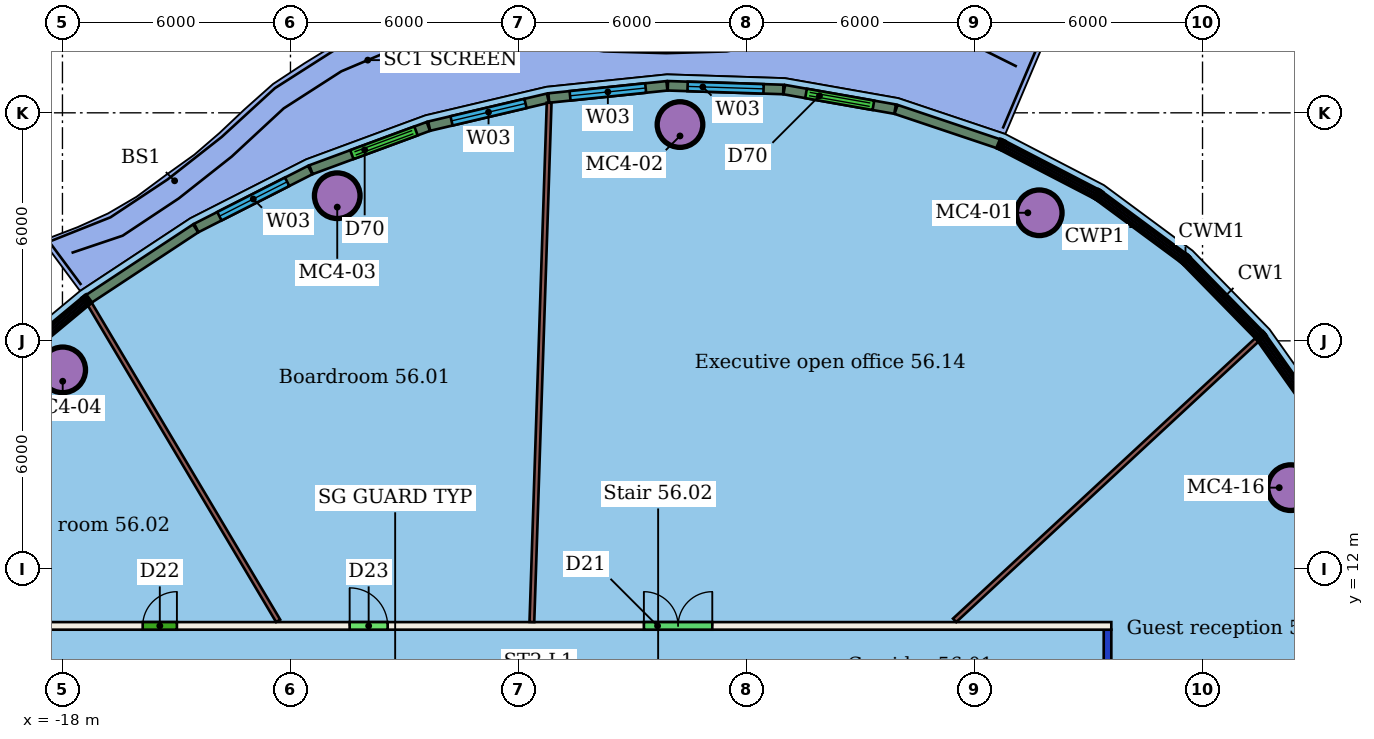
"""IFC4 building model, lengths in metres.
Left out: names, types, materials, properties, quantities, classifications, styles, units other than length and angle.
Written with IfcOpenShell. Run it as: python <this file> out.ifc"""

import sys

from ifc_helpers import new_model, si_unit, direction, frame, frame_2d, origin, origin_2d, place, context, subcontext, project, spatial, rectangle, hollow_circle, extrude, element, fill, save


model = new_model("IFC4")
c1 = context("Model", 3, precision=1e-05, world=origin(), true_north=direction((0.0, 1.0)))
c2 = subcontext(c1, "Body", "Model", "MODEL_VIEW")
j1 = project(units=[si_unit("LENGTHUNIT", "METRE"), si_unit("PLANEANGLEUNIT", "RADIAN")], contexts=[c1])
p1 = place(None, origin())
s1 = spatial("IfcSite", under=j1, at=p1, CompositionType="ELEMENT")
p2 = place(p1, origin())
s2 = spatial("IfcBuilding", under=s1, at=p2, CompositionType="ELEMENT")
p3 = place(p2, frame((0.0, 0.0, 228.1)))
s3 = spatial("IfcBuildingStorey", under=s2, at=p3, CompositionType="ELEMENT", Elevation=228.1)
for number, where, z_axis, x_axis in (
    (1, (7.704, 21.37, 0.0), (0.0, 0.0, 1.0), (1.0, 0.0, 0.0)),
    (2, (-1.75, 23.691, 0.0), (0.0, 0.0, 1.0), (1.0, 0.0, 0.0)),
    (3, (-10.769, 21.819, 0.0), (0.0, 0.0, 1.0), (1.0, 0.0, 0.0)),
    (4, (-17.993, 17.237, 0.0), (0.0, 0.0, 1.0), (1.0, 0.0, 0.0)),
    (5, (14.318, 14.137, 0.0), (0.0, 0.0, 1.0), (1.0, 0.0, 0.0)),
):
    element("IfcColumn", number, at=place(p3, frame(where, z_axis=z_axis, x_axis=x_axis)), inside=s3, PredefinedType="COLUMN", context=c2, shape_type="SweptSolid", body=[
        extrude(hollow_circle(Radius=0.6, WallThickness=0.045, at=origin_2d()), origin(), (0.0, 0.0, 1.0), 3.45),
    ])
p4 = place(p3, frame((-21.6, 10.5, 0.0), z_axis=(0.0, 0.0, 1.0), x_axis=(1.0, 0.0, 0.0)))
e6 = element("IfcWall", 6, at=p4, inside=s3, PredefinedType="PARTITIONING", context=c2, shape_type="SweptSolid", body=[
    extrude(rectangle(XDim=31.2, YDim=0.2, at=frame_2d((15.6, 0.0))), origin(), (0.0, 0.0, 1.0), 3.45),
])
p5 = place(p4, frame((11.157, 0.0, 0.0)))
e7 = element("IfcOpeningElement", 7, at=p5, cuts=e6, PredefinedType="OPENING", context=c2, shape_type="SweptSolid", body=[
    extrude(rectangle(XDim=1.0, YDim=2.4, at=frame_2d((0.5, 1.2))), frame((0.0, 0.11, 0.0), z_axis=(0.0, -1.0, 0.0), x_axis=(1.0, 0.0, 0.0)), (0.0, 0.0, 1.0), 0.22),
])
p6 = place(p4, frame((5.712, 0.0, 0.0)))
e8 = element("IfcOpeningElement", 8, at=p6, cuts=e6, PredefinedType="OPENING", context=c2, shape_type="SweptSolid", body=[
    extrude(rectangle(XDim=0.9, YDim=2.1, at=frame_2d((0.45, 1.05))), frame((0.0, 0.11, 0.0), z_axis=(0.0, -1.0, 0.0), x_axis=(1.0, 0.0, 0.0)), (0.0, 0.0, 1.0), 0.22),
])
p7 = place(p4, frame((18.9, 0.0, 0.0)))
e9 = element("IfcOpeningElement", 9, at=p7, cuts=e6, PredefinedType="OPENING", context=c2, shape_type="SweptSolid", body=[
    extrude(rectangle(XDim=1.8, YDim=2.1, at=frame_2d((0.9, 1.05))), frame((0.0, 0.11, 0.0), z_axis=(0.0, -1.0, 0.0), x_axis=(1.0, 0.0, 0.0)), (0.0, 0.0, 1.0), 0.22),
])
p8 = place(p3, frame((9.5, 10.4, 0.0), z_axis=(0.0, 0.0, 1.0), x_axis=(0.0, -1.0, 0.0)))
e10 = element("IfcWall", 10, at=p8, inside=s3, PredefinedType="PARTITIONING", context=c2, shape_type="SweptSolid", body=[
    extrude(rectangle(XDim=20.8, YDim=0.2, at=frame_2d((10.4, 0.0))), origin(), (0.0, 0.0, 1.0), 3.05),
])
p9 = place(p8, frame((16.182, 0.0, 0.0)))
e11 = element("IfcOpeningElement", 11, at=p9, cuts=e10, PredefinedType="OPENING", context=c2, shape_type="SweptSolid", body=[
    extrude(rectangle(XDim=1.0, YDim=2.4, at=frame_2d((0.5, 1.2))), frame((0.0, 0.11, 0.0), z_axis=(0.0, -1.0, 0.0), x_axis=(1.0, 0.0, 0.0)), (0.0, 0.0, 1.0), 0.22),
])
p10 = place(p8, frame((12.086, 0.0, 0.0)))
e12 = element("IfcOpeningElement", 12, at=p10, cuts=e10, PredefinedType="OPENING", context=c2, shape_type="SweptSolid", body=[
    extrude(rectangle(XDim=1.0, YDim=2.4, at=frame_2d((0.5, 1.2))), frame((0.0, 0.11, 0.0), z_axis=(0.0, -1.0, 0.0), x_axis=(1.0, 0.0, 0.0)), (0.0, 0.0, 1.0), 0.22),
])
p11 = place(p8, frame((6.779, 0.0, 0.0)))
e13 = element("IfcOpeningElement", 13, at=p11, cuts=e10, PredefinedType="OPENING", context=c2, shape_type="SweptSolid", body=[
    extrude(rectangle(XDim=0.9, YDim=2.1, at=frame_2d((0.45, 1.05))), frame((0.0, 0.11, 0.0), z_axis=(0.0, -1.0, 0.0), x_axis=(1.0, 0.0, 0.0)), (0.0, 0.0, 1.0), 0.22),
])
p12 = place(p8, frame((2.875, 0.0, 0.0)))
e14 = element("IfcOpeningElement", 14, at=p12, cuts=e10, PredefinedType="OPENING", context=c2, shape_type="SweptSolid", body=[
    extrude(rectangle(XDim=1.2, YDim=2.4, at=frame_2d((0.6, 1.2))), frame((0.0, 0.11, 0.0), z_axis=(0.0, -1.0, 0.0), x_axis=(1.0, 0.0, 0.0)), (0.0, 0.0, 1.0), 0.22),
])
p13 = place(p3, frame((-5.193, 24.265, 0.0), z_axis=(0.0, 0.0, 1.0), x_axis=(-0.033235742761, -0.999447540096, 0.0)))
e15 = element("IfcWall", 15, at=p13, inside=s3, PredefinedType="PARTITIONING", context=c2, shape_type="SweptSolid", body=[
    extrude(rectangle(XDim=13.67, YDim=0.125, at=frame_2d((6.835, 0.0))), origin(), (0.0, 0.0, 1.0), 3.45),
])
p14 = place(p3, frame((-17.283, 18.97, 0.0), z_axis=(0.0, 0.0, 1.0), x_axis=(0.51119848964, -0.859462683419, 0.0)))
e16 = element("IfcWall", 16, at=p14, inside=s3, PredefinedType="PARTITIONING", context=c2, shape_type="SweptSolid", body=[
    extrude(rectangle(XDim=9.702, YDim=0.125, at=frame_2d((4.851, 0.0))), origin(), (0.0, 0.0, 1.0), 3.45),
])
p15 = place(p3, frame((13.437, 18.031, 0.0), z_axis=(0.0, 0.0, 1.0), x_axis=(-0.733128123603, -0.680090548665, 0.0)))
e17 = element("IfcWall", 17, at=p15, inside=s3, PredefinedType="PARTITIONING", context=c2, shape_type="SweptSolid", body=[
    extrude(rectangle(XDim=10.859, YDim=0.125, at=frame_2d((5.429, 0.0))), origin(), (0.0, 0.0, 1.0), 3.45),
])
p16 = place(p3, frame((6.642, 23.183, 0.0), z_axis=(0.0, 0.0, 1.0), x_axis=(-0.948125770961, 0.31789545835, 0.0)))
e18 = element("IfcWall", 18, at=p16, inside=s3, PredefinedType="SOLIDWALL", context=c2, shape_type="SweptSolid", body=[
    extrude(rectangle(XDim=2.854, YDim=0.25, at=frame_2d((1.427, 0.0))), origin(), (0.0, 0.0, 1.0), 3.1),
])
p17 = place(p3, frame((3.91, 24.097, 0.0), z_axis=(0.0, 0.0, 1.0), x_axis=(-0.984808450363, 0.173644222745, 0.0)))
e19 = element("IfcWall", 19, at=p17, inside=s3, PredefinedType="SOLIDWALL", context=c2, shape_type="SweptSolid", body=[
    extrude(rectangle(XDim=2.961, YDim=0.25, at=frame_2d((1.48, 0.0))), origin(), (0.0, 0.0, 1.0), 3.1),
])
p18 = place(p17, frame((0.58, 0.0, 0.0)))
e20 = element("IfcOpeningElement", 20, at=p18, cuts=e19, PredefinedType="OPENING", context=c2, shape_type="SweptSolid", body=[
    extrude(rectangle(XDim=1.8, YDim=2.4, at=frame_2d((0.9, 1.2))), frame((0.0, 0.135, 0.0), z_axis=(0.0, -1.0, 0.0), x_axis=(1.0, 0.0, 0.0)), (0.0, 0.0, 1.0), 0.27),
])
p19 = place(p3, frame((0.969, 24.614, 0.0), z_axis=(0.0, 0.0, 1.0), x_axis=(-0.999483698552, 0.032129991113, 0.0)))
e21 = element("IfcWall", 21, at=p19, inside=s3, PredefinedType="SOLIDWALL", context=c2, shape_type="SweptSolid", body=[
    extrude(rectangle(XDim=3.039, YDim=0.25, at=frame_2d((1.52, 0.0))), origin(), (0.0, 0.0, 1.0), 3.1),
])
p20 = place(p19, frame((0.52, 0.0, 0.9)))
e22 = element("IfcOpeningElement", 22, at=p20, cuts=e21, PredefinedType="OPENING", context=c2, shape_type="SweptSolid", body=[
    extrude(rectangle(XDim=2.0, YDim=2.1, at=frame_2d((1.0, 1.05))), frame((0.0, 0.135, 0.0), z_axis=(0.0, -1.0, 0.0), x_axis=(1.0, 0.0, 0.0)), (0.0, 0.0, 1.0), 0.27),
])
p21 = place(p3, frame((-2.094, 24.711, 0.0), z_axis=(0.0, 0.0, 1.0), x_axis=(-0.994698961738, -0.102829837679, 0.0)))
e23 = element("IfcWall", 23, at=p21, inside=s3, PredefinedType="SOLIDWALL", context=c2, shape_type="SweptSolid", body=[
    extrude(rectangle(XDim=3.125, YDim=0.25, at=frame_2d((1.562, 0.0))), origin(), (0.0, 0.0, 1.0), 3.1),
])
p22 = place(p21, frame((0.562, 0.0, 0.9)))
e24 = element("IfcOpeningElement", 24, at=p22, cuts=e23, PredefinedType="OPENING", context=c2, shape_type="SweptSolid", body=[
    extrude(rectangle(XDim=2.0, YDim=2.1, at=frame_2d((1.0, 1.05))), frame((0.0, 0.135, 0.0), z_axis=(0.0, -1.0, 0.0), x_axis=(1.0, 0.0, 0.0)), (0.0, 0.0, 1.0), 0.27),
])
p23 = place(p3, frame((-5.226, 24.385, 0.0), z_axis=(0.0, 0.0, 1.0), x_axis=(-0.973354292657, -0.229306391027, 0.0)))
e25 = element("IfcWall", 25, at=p23, inside=s3, PredefinedType="SOLIDWALL", context=c2, shape_type="SweptSolid", body=[
    extrude(rectangle(XDim=3.21, YDim=0.25, at=frame_2d((1.605, 0.0))), origin(), (0.0, 0.0, 1.0), 3.1),
])
p24 = place(p23, frame((0.605, 0.0, 0.9)))
e26 = element("IfcOpeningElement", 26, at=p24, cuts=e25, PredefinedType="OPENING", context=c2, shape_type="SweptSolid", body=[
    extrude(rectangle(XDim=2.0, YDim=2.1, at=frame_2d((1.0, 1.05))), frame((0.0, 0.135, 0.0), z_axis=(0.0, -1.0, 0.0), x_axis=(1.0, 0.0, 0.0)), (0.0, 0.0, 1.0), 0.27),
])
p25 = place(p3, frame((-8.373, 23.642, 0.0), z_axis=(0.0, 0.0, 1.0), x_axis=(-0.938142825337, -0.346248522408, 0.0)))
e27 = element("IfcWall", 27, at=p25, inside=s3, PredefinedType="SOLIDWALL", context=c2, shape_type="SweptSolid", body=[
    extrude(rectangle(XDim=3.291, YDim=0.25, at=frame_2d((1.646, 0.0))), origin(), (0.0, 0.0, 1.0), 3.1),
])
p26 = place(p25, frame((0.345, 0.0, 0.0)))
e28 = element("IfcOpeningElement", 28, at=p26, cuts=e27, PredefinedType="OPENING", context=c2, shape_type="SweptSolid", body=[
    extrude(rectangle(XDim=1.8, YDim=2.4, at=frame_2d((0.9, 1.2))), frame((0.0, 0.135, 0.0), z_axis=(0.0, -1.0, 0.0), x_axis=(1.0, 0.0, 0.0)), (0.0, 0.0, 1.0), 0.27),
])
p27 = place(p3, frame((-11.48, 22.494, 0.0), z_axis=(0.0, 0.0, 1.0), x_axis=(-0.891355783228, -0.453304387478, 0.0)))
e29 = element("IfcWall", 29, at=p27, inside=s3, PredefinedType="SOLIDWALL", context=c2, shape_type="SweptSolid", body=[
    extrude(rectangle(XDim=3.361, YDim=0.25, at=frame_2d((1.681, 0.0))), origin(), (0.0, 0.0, 1.0), 3.1),
])
p28 = place(p27, frame((0.681, 0.0, 0.9)))
e30 = element("IfcOpeningElement", 30, at=p28, cuts=e29, PredefinedType="OPENING", context=c2, shape_type="SweptSolid", body=[
    extrude(rectangle(XDim=2.0, YDim=2.1, at=frame_2d((1.0, 1.05))), frame((0.0, 0.135, 0.0), z_axis=(0.0, -1.0, 0.0), x_axis=(1.0, 0.0, 0.0)), (0.0, 0.0, 1.0), 0.27),
])
p29 = place(p3, frame((-14.496, 20.959, 0.0), z_axis=(0.0, 0.0, 1.0), x_axis=(-0.834690576906, -0.550719203247, 0.0)))
e31 = element("IfcWall", 31, at=p29, inside=s3, PredefinedType="SOLIDWALL", context=c2, shape_type="SweptSolid", body=[
    extrude(rectangle(XDim=3.374, YDim=0.25, at=frame_2d((1.687, 0.0))), origin(), (0.0, 0.0, 1.0), 3.1),
])
p30 = place(p5, origin())
e32 = element("IfcDoor", 32, at=p30, inside=s3, OperationType="SINGLE_SWING_LEFT", PredefinedType="DOOR", context=c2, shape_type="SweptSolid", body=[
    extrude(rectangle(XDim=1.0, YDim=2.4, at=frame_2d((0.5, 1.2))), frame((0.0, 0.025, 0.0), z_axis=(0.0, -1.0, 0.0), x_axis=(1.0, 0.0, 0.0)), (0.0, 0.0, 1.0), 0.05),
])
fill(e7, e32)
p31 = place(p6, origin())
e33 = element("IfcDoor", 33, at=p31, inside=s3, OperationType="SINGLE_SWING_RIGHT", PredefinedType="DOOR", context=c2, shape_type="SweptSolid", body=[
    extrude(rectangle(XDim=0.9, YDim=2.1, at=frame_2d((0.45, 1.05))), frame((0.0, 0.025, 0.0), z_axis=(0.0, -1.0, 0.0), x_axis=(1.0, 0.0, 0.0)), (0.0, 0.0, 1.0), 0.05),
])
fill(e8, e33)
p32 = place(p7, origin())
e34 = element("IfcDoor", 34, at=p32, inside=s3, OperationType="DOUBLE_DOOR_SINGLE_SWING", PredefinedType="DOOR", context=c2, shape_type="SweptSolid", body=[
    extrude(rectangle(XDim=1.8, YDim=2.1, at=frame_2d((0.9, 1.05))), frame((0.0, 0.025, 0.0), z_axis=(0.0, -1.0, 0.0), x_axis=(1.0, 0.0, 0.0)), (0.0, 0.0, 1.0), 0.05),
])
fill(e9, e34)
p33 = place(p18, origin())
e35 = element("IfcDoor", 35, at=p33, inside=s3, OperationType="DOUBLE_DOOR_SLIDING", PredefinedType="DOOR", context=c2, shape_type="SweptSolid", body=[
    extrude(rectangle(XDim=1.8, YDim=2.4, at=frame_2d((0.9, 1.2))), frame((0.0, 0.025, 0.0), z_axis=(0.0, -1.0, 0.0), x_axis=(1.0, 0.0, 0.0)), (0.0, 0.0, 1.0), 0.05),
])
fill(e20, e35)
p34 = place(p20, origin())
e36 = element("IfcWindow", 36, at=p34, inside=s3, PartitioningType="SINGLE_PANEL", PredefinedType="WINDOW", context=c2, shape_type="SweptSolid", body=[
    extrude(rectangle(XDim=2.0, YDim=2.1, at=frame_2d((1.0, 1.05))), frame((0.0, 0.03, 0.0), z_axis=(0.0, -1.0, 0.0), x_axis=(1.0, 0.0, 0.0)), (0.0, 0.0, 1.0), 0.06),
])
fill(e22, e36)
p35 = place(p22, origin())
e37 = element("IfcWindow", 37, at=p35, inside=s3, PartitioningType="SINGLE_PANEL", PredefinedType="WINDOW", context=c2, shape_type="SweptSolid", body=[
    extrude(rectangle(XDim=2.0, YDim=2.1, at=frame_2d((1.0, 1.05))), frame((0.0, 0.03, 0.0), z_axis=(0.0, -1.0, 0.0), x_axis=(1.0, 0.0, 0.0)), (0.0, 0.0, 1.0), 0.06),
])
fill(e24, e37)
p36 = place(p24, origin())
e38 = element("IfcWindow", 38, at=p36, inside=s3, PartitioningType="SINGLE_PANEL", PredefinedType="WINDOW", context=c2, shape_type="SweptSolid", body=[
    extrude(rectangle(XDim=2.0, YDim=2.1, at=frame_2d((1.0, 1.05))), frame((0.0, 0.03, 0.0), z_axis=(0.0, -1.0, 0.0), x_axis=(1.0, 0.0, 0.0)), (0.0, 0.0, 1.0), 0.06),
])
fill(e26, e38)
p37 = place(p26, origin())
e39 = element("IfcDoor", 39, at=p37, inside=s3, OperationType="DOUBLE_DOOR_SLIDING", PredefinedType="DOOR", context=c2, shape_type="SweptSolid", body=[
    extrude(rectangle(XDim=1.8, YDim=2.4, at=frame_2d((0.9, 1.2))), frame((0.0, 0.025, 0.0), z_axis=(0.0, -1.0, 0.0), x_axis=(1.0, 0.0, 0.0)), (0.0, 0.0, 1.0), 0.05),
])
fill(e28, e39)
p38 = place(p28, origin())
e40 = element("IfcWindow", 40, at=p38, inside=s3, PartitioningType="SINGLE_PANEL", PredefinedType="WINDOW", context=c2, shape_type="SweptSolid", body=[
    extrude(rectangle(XDim=2.0, YDim=2.1, at=frame_2d((1.0, 1.05))), frame((0.0, 0.03, 0.0), z_axis=(0.0, -1.0, 0.0), x_axis=(1.0, 0.0, 0.0)), (0.0, 0.0, 1.0), 0.06),
])
fill(e30, e40)
save(model, sys.argv[1])
